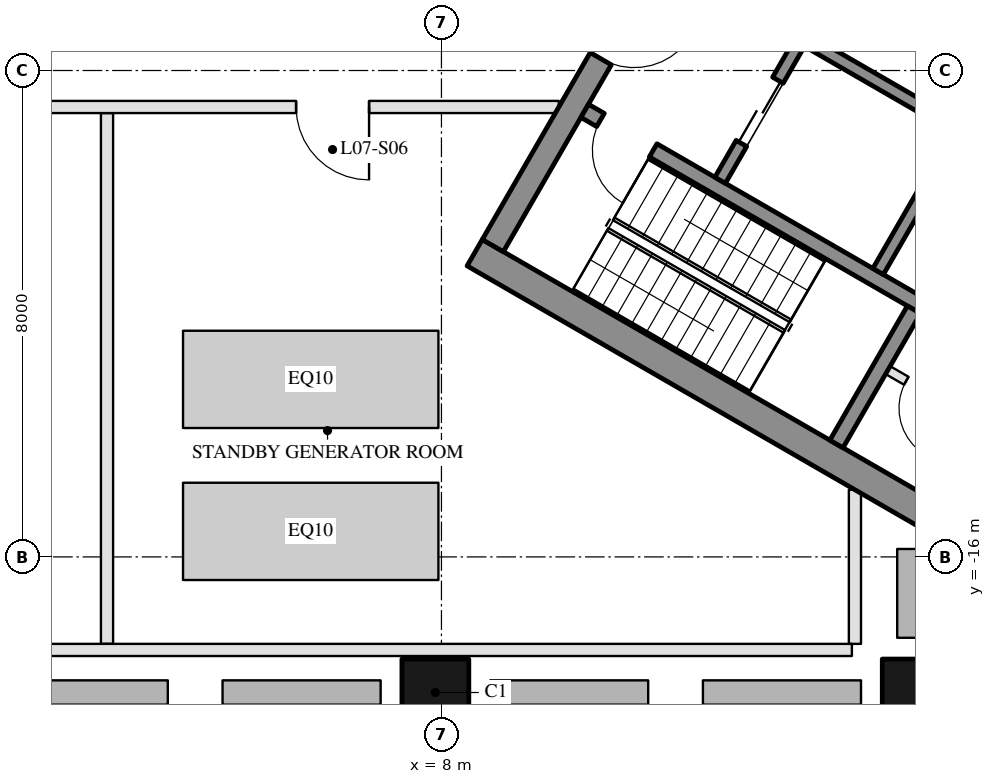
"""IFC4 building model, lengths in metres.
Left out: names, types, materials, properties, quantities, classifications, styles, units other than length and angle.
Written with IfcOpenShell. Run it as: python <this file> out.ifc"""

import sys

from ifc_helpers import new_model, si_unit, direction, frame, frame_2d, origin, origin_2d, place, context, subcontext, project, spatial, rectangle, hollow_rectangle, extrude, element, fill, save


model = new_model("IFC4")
c1 = context("Model", 3, precision=1e-05, world=origin(), true_north=direction((0.0, 1.0)))
c2 = subcontext(c1, "Body", "Model", "MODEL_VIEW")
j1 = project(units=[si_unit("LENGTHUNIT", "METRE"), si_unit("PLANEANGLEUNIT", "RADIAN")], contexts=[c1])
p1 = place(None, origin())
s1 = spatial("IfcSite", under=j1, at=p1, CompositionType="ELEMENT")
p2 = place(p1, origin())
s2 = spatial("IfcBuilding", under=s1, at=p2, CompositionType="ELEMENT")
p3 = place(p2, frame((0.0, 0.0, 42.0)))
s3 = spatial("IfcBuildingStorey", under=s2, at=p3, CompositionType="ELEMENT", Elevation=42.0)
for number, where, z_axis, x_axis in (
    (1, (7.9, -18.23, 0.0), (0.0, 0.0, 1.0), (-1.0, 0.0, 0.0)),
    (2, (15.8, -18.23, 0.0), (0.0, 0.0, 1.0), (-1.0, 0.0, 0.0)),
):
    element("IfcColumn", number, at=place(p3, frame(where, z_axis=z_axis, x_axis=x_axis)), inside=s3, PredefinedType="COLUMN", context=c2, shape_type="SweptSolid", body=[
        extrude(hollow_rectangle(XDim=1.1, YDim=1.1, WallThickness=0.05, at=origin_2d()), origin(), (0.0, 0.0, 1.0), 4.5),
    ])
for number, where, z_axis, x_axis in (
    (3, (8.547, -10.997, 0.0), (0.0, 0.0, 1.0), (0.866, -0.5, 0.0)),
    (4, (13.797, -1.903, 0.0), (0.0, 0.0, 1.0), (0.866, -0.5, 0.0)),
):
    element("IfcWall", number, at=place(p3, frame(where, z_axis=z_axis, x_axis=x_axis)), inside=s3, PredefinedType="SHEAR", context=c2, shape_type="SweptSolid", body=[
        extrude(rectangle(XDim=14.837, YDim=0.5, at=frame_2d((7.418, 0.0))), origin(), (0.0, 0.0, 1.0), 4.3),
    ])
p4 = place(p3, frame((8.845, -10.88, 0.0), z_axis=(0.0, 0.0, 1.0), x_axis=(0.500004234368, 0.866022959057, 0.0)))
e5 = element("IfcWall", 5, at=p4, inside=s3, PredefinedType="SHEAR", context=c2, shape_type="SweptSolid", body=[
    extrude(rectangle(XDim=10.0, YDim=0.4, at=frame_2d((5.0, 0.0))), origin(), (0.0, 0.0, 1.0), 4.3),
])
p5 = place(p4, frame((3.55, 0.0, 0.0)))
e6 = element("IfcOpeningElement", 6, at=p5, cuts=e5, PredefinedType="OPENING", context=c2, shape_type="SweptSolid", body=[
    extrude(rectangle(XDim=1.1, YDim=2.1, at=frame_2d((0.55, 1.05))), frame((0.0, 0.21, 0.0), z_axis=(0.0, -1.0, 0.0), x_axis=(1.0, 0.0, 0.0)), (0.0, 0.0, 1.0), 0.42),
])
p6 = place(p4, frame((5.85, 0.0, 0.0)))
e7 = element("IfcOpeningElement", 7, at=p6, cuts=e5, PredefinedType="OPENING", context=c2, shape_type="SweptSolid", body=[
    extrude(rectangle(XDim=1.4, YDim=2.1, at=frame_2d((0.7, 1.05))), frame((0.0, 0.21, 0.0), z_axis=(0.0, -1.0, 0.0), x_axis=(1.0, 0.0, 0.0)), (0.0, 0.0, 1.0), 0.42),
])
p7 = place(p3, frame((10.356, -8.664, 0.0), z_axis=(0.0, 0.0, 1.0), x_axis=(0.866028629588, -0.499994412703, 0.0)))
e8 = element("IfcWall", 8, at=p7, inside=s3, PredefinedType="SHEAR", context=c2, shape_type="SweptSolid", body=[
    extrude(rectangle(XDim=6.45, YDim=0.25, at=frame_2d((3.225, 0.0))), origin(), (0.0, 0.0, 1.0), 4.3),
])
p8 = place(p7, frame((0.3, 0.0, 0.0)))
e9 = element("IfcOpeningElement", 9, at=p8, cuts=e8, PredefinedType="OPENING", context=c2, shape_type="SweptSolid", body=[
    extrude(rectangle(XDim=1.0, YDim=2.1, at=frame_2d((0.5, 1.05))), frame((0.0, 0.135, 0.0), z_axis=(0.0, -1.0, 0.0), x_axis=(1.0, 0.0, 0.0)), (0.0, 0.0, 1.0), 0.27),
])
p9 = place(p3, frame((14.496, -14.143, 0.0), z_axis=(0.0, 0.0, 1.0), x_axis=(0.500062241894, 0.865989465428, 0.0)))
e10 = element("IfcWall", 10, at=p9, inside=s3, PredefinedType="SHEAR", context=c2, shape_type="SweptSolid", body=[
    extrude(rectangle(XDim=2.55, YDim=0.25, at=frame_2d((1.275, 0.0))), origin(), (0.0, 0.0, 1.0), 4.3),
])
p10 = place(p3, frame((15.181, -11.305, 0.0), z_axis=(0.0, 0.0, 1.0), x_axis=(0.49994636267, 0.866056369097, 0.0)))
e11 = element("IfcWall", 11, at=p10, inside=s3, PredefinedType="SHEAR", context=c2, shape_type="SweptSolid", body=[
    extrude(rectangle(XDim=2.8, YDim=0.2, at=frame_2d((1.4, 0.0))), origin(), (0.0, 0.0, 1.0), 4.3),
])
p11 = place(p3, frame((12.583, -9.805, 0.0), z_axis=(0.0, 0.0, 1.0), x_axis=(0.49994636267, 0.866056369097, 0.0)))
e12 = element("IfcWall", 12, at=p11, inside=s3, PredefinedType="SHEAR", context=c2, shape_type="SweptSolid", body=[
    extrude(rectangle(XDim=2.8, YDim=0.2, at=frame_2d((1.4, 0.0))), origin(), (0.0, 0.0, 1.0), 4.3),
])
p12 = place(p11, frame((0.7, 0.0, 0.0)))
e13 = element("IfcOpeningElement", 13, at=p12, cuts=e12, PredefinedType="OPENING", context=c2, shape_type="SweptSolid", body=[
    extrude(rectangle(XDim=1.2, YDim=2.1, at=frame_2d((0.6, 1.05))), frame((0.0, 0.11, 0.0), z_axis=(0.0, -1.0, 0.0), x_axis=(1.0, 0.0, 0.0)), (0.0, 0.0, 1.0), 0.22),
])
p13 = place(p3, frame((14.02, -7.517, 0.0), z_axis=(0.0, 0.0, 1.0), x_axis=(0.866034573852, -0.49998411664, 0.0)))
e14 = element("IfcWall", 14, at=p13, inside=s3, PredefinedType="SHEAR", context=c2, shape_type="SweptSolid", body=[
    extrude(rectangle(XDim=2.8, YDim=0.2, at=frame_2d((1.4, 0.0))), origin(), (0.0, 0.0, 1.0), 4.3),
])
p14 = place(p3, frame((12.968, -4.138, 0.0), z_axis=(0.0, 0.0, 1.0), x_axis=(0.866028328073, -0.49999493495, 0.0)))
e15 = element("IfcWall", 15, at=p14, inside=s3, PredefinedType="SHEAR", context=c2, shape_type="SweptSolid", body=[
    extrude(rectangle(XDim=10.16, YDim=0.2, at=frame_2d((5.08, 0.0))), origin(), (0.0, 0.0, 1.0), 4.3),
])
p15 = place(p3, frame((15.342, -12.928, 0.0), z_axis=(0.0, 0.0, 1.0), x_axis=(0.865989903783, -0.500061482766, 0.0)))
e16 = element("IfcWall", 16, at=p15, inside=s3, PredefinedType="PARTITIONING", context=c2, shape_type="SweptSolid", body=[
    extrude(rectangle(XDim=1.6, YDim=0.15, at=frame_2d((0.8, 0.0))), origin(), (0.0, 0.0, 1.0), 4.3),
])
p16 = place(p15, frame((0.35, 0.0, 0.0)))
e17 = element("IfcOpeningElement", 17, at=p16, cuts=e16, PredefinedType="OPENING", context=c2, shape_type="SweptSolid", body=[
    extrude(rectangle(XDim=0.9, YDim=2.1, at=frame_2d((0.45, 1.05))), frame((0.0, 0.085, 0.0), z_axis=(0.0, -1.0, 0.0), x_axis=(1.0, 0.0, 0.0)), (0.0, 0.0, 1.0), 0.17),
])
p17 = place(p3, frame((2.5, -17.43, 0.0), z_axis=(0.0, 0.0, 1.0), x_axis=(0.0, 1.0, 0.0)))
e18 = element("IfcWall", 18, at=p17, inside=s3, PredefinedType="PARTITIONING", context=c2, shape_type="SweptSolid", body=[
    extrude(rectangle(XDim=8.73, YDim=0.2, at=frame_2d((4.365, 0.0))), origin(), (0.0, 0.0, 1.0), 4.35),
])
p18 = place(p3, frame((14.8, -17.43, 0.0), z_axis=(0.0, 0.0, 1.0), x_axis=(0.0, 1.0, 0.0)))
e19 = element("IfcWall", 19, at=p18, inside=s3, PredefinedType="PARTITIONING", context=c2, shape_type="SweptSolid", body=[
    extrude(rectangle(XDim=2.534, YDim=0.2, at=frame_2d((1.267, 0.0))), origin(), (0.0, 0.0, 1.0), 4.35),
])
p19 = place(p3, frame((-14.75, -17.53, 0.0), z_axis=(0.0, 0.0, 1.0), x_axis=(1.0, 0.0, 0.0)))
e20 = element("IfcWall", 20, at=p19, inside=s3, PredefinedType="PARTITIONING", context=c2, shape_type="SweptSolid", body=[
    extrude(rectangle(XDim=29.5, YDim=0.2, at=frame_2d((14.75, 0.0))), origin(), (0.0, 0.0, 1.0), 3.75),
])
p20 = place(p3, frame((-9.93, -8.6, 0.0), z_axis=(0.0, 0.0, 1.0), x_axis=(1.0, 0.0, 0.0)))
e21 = element("IfcWall", 21, at=p20, inside=s3, PredefinedType="PARTITIONING", context=c2, shape_type="SweptSolid", body=[
    extrude(rectangle(XDim=19.861, YDim=0.2, at=frame_2d((9.93, 0.0))), origin(), (0.0, 0.0, 1.0), 3.75),
])
p21 = place(p20, frame((2.121, 0.0, 0.0)))
e22 = element("IfcOpeningElement", 22, at=p21, cuts=e21, PredefinedType="OPENING", context=c2, shape_type="SweptSolid", body=[
    extrude(rectangle(XDim=1.2, YDim=2.1, at=frame_2d((0.6, 1.05))), frame((0.0, 0.11, 0.0), z_axis=(0.0, -1.0, 0.0), x_axis=(1.0, 0.0, 0.0)), (0.0, 0.0, 1.0), 0.22),
])
p22 = place(p20, frame((8.331, 0.0, 0.0)))
e23 = element("IfcOpeningElement", 23, at=p22, cuts=e21, PredefinedType="OPENING", context=c2, shape_type="SweptSolid", body=[
    extrude(rectangle(XDim=1.2, YDim=2.1, at=frame_2d((0.6, 1.05))), frame((0.0, 0.11, 0.0), z_axis=(0.0, -1.0, 0.0), x_axis=(1.0, 0.0, 0.0)), (0.0, 0.0, 1.0), 0.22),
])
p23 = place(p20, frame((15.54, 0.0, 0.0)))
e24 = element("IfcOpeningElement", 24, at=p23, cuts=e21, PredefinedType="OPENING", context=c2, shape_type="SweptSolid", body=[
    extrude(rectangle(XDim=1.2, YDim=2.1, at=frame_2d((0.6, 1.05))), frame((0.0, 0.11, 0.0), z_axis=(0.0, -1.0, 0.0), x_axis=(1.0, 0.0, 0.0)), (0.0, 0.0, 1.0), 0.22),
])
p24 = place(p12, origin())
e25 = element("IfcDoor", 25, at=p24, inside=s3, OperationType="DOUBLE_DOOR_SLIDING", PredefinedType="DOOR", context=c2, shape_type="SweptSolid", body=[
    extrude(rectangle(XDim=1.2, YDim=2.1, at=frame_2d((0.6, 1.05))), frame((0.0, 0.025, 0.0), z_axis=(0.0, -1.0, 0.0), x_axis=(1.0, 0.0, 0.0)), (0.0, 0.0, 1.0), 0.05),
])
fill(e13, e25)
p25 = place(p16, frame((0.9, 0.0, 0.0), z_axis=(0.0, 0.0, 1.0), x_axis=(-1.0, 0.0, 0.0)))
e26 = element("IfcDoor", 26, at=p25, inside=s3, OperationType="SINGLE_SWING_LEFT", PredefinedType="DOOR", context=c2, shape_type="SweptSolid", body=[
    extrude(rectangle(XDim=0.9, YDim=2.1, at=frame_2d((0.45, 1.05))), frame((0.0, 0.025, 0.0), z_axis=(0.0, -1.0, 0.0), x_axis=(1.0, 0.0, 0.0)), (0.0, 0.0, 1.0), 0.05),
])
fill(e17, e26)
p26 = place(p5, frame((1.1, 0.0, 0.0), z_axis=(0.0, 0.0, 1.0), x_axis=(-1.0, 0.0, 0.0)))
e27 = element("IfcDoor", 27, at=p26, inside=s3, OperationType="SINGLE_SWING_LEFT", PredefinedType="DOOR", context=c2, shape_type="SweptSolid", body=[
    extrude(rectangle(XDim=1.1, YDim=2.1, at=frame_2d((0.55, 1.05))), frame((0.0, 0.025, 0.0), z_axis=(0.0, -1.0, 0.0), x_axis=(1.0, 0.0, 0.0)), (0.0, 0.0, 1.0), 0.05),
])
fill(e6, e27)
p27 = place(p8, frame((1.0, 0.0, 0.0), z_axis=(0.0, 0.0, 1.0), x_axis=(-1.0, 0.0, 0.0)))
e28 = element("IfcDoor", 28, at=p27, inside=s3, OperationType="SINGLE_SWING_LEFT", PredefinedType="DOOR", context=c2, shape_type="SweptSolid", body=[
    extrude(rectangle(XDim=1.0, YDim=2.1, at=frame_2d((0.5, 1.05))), frame((0.0, 0.025, 0.0), z_axis=(0.0, -1.0, 0.0), x_axis=(1.0, 0.0, 0.0)), (0.0, 0.0, 1.0), 0.05),
])
fill(e9, e28)
p28 = place(p23, frame((1.2, 0.0, 0.0), z_axis=(0.0, 0.0, 1.0), x_axis=(-1.0, 0.0, 0.0)))
e29 = element("IfcDoor", 29, at=p28, inside=s3, OperationType="SINGLE_SWING_LEFT", PredefinedType="DOOR", context=c2, shape_type="SweptSolid", body=[
    extrude(rectangle(XDim=1.2, YDim=2.1, at=frame_2d((0.6, 1.05))), frame((0.0, 0.025, 0.0), z_axis=(0.0, -1.0, 0.0), x_axis=(1.0, 0.0, 0.0)), (0.0, 0.0, 1.0), 0.05),
])
fill(e24, e29)
save(model, sys.argv[1])
